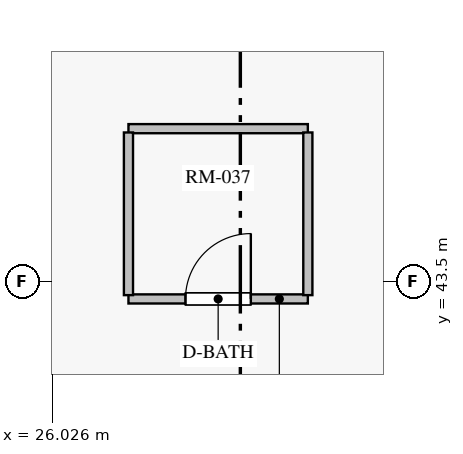
"""IFC4 building model, lengths in metres.
Left out: names, types, materials, properties, quantities, classifications, styles, units other than length and angle.
Written with IfcOpenShell. Run it as: python <this file> out.ifc"""

import sys

from ifc_helpers import new_model, si_unit, direction, frame, frame_2d, origin, origin_with_axes, place, context, subcontext, project, spatial, rectangle, extrude, source, transform, mapped, element, fill, save


model = new_model("IFC4")
c1 = context("Model", 3, precision=1e-05, world=origin(), true_north=direction((0.0, 1.0)))
c2 = subcontext(c1, "Body", "Model", "MODEL_VIEW")
j1 = project(units=[si_unit("LENGTHUNIT", "METRE"), si_unit("PLANEANGLEUNIT", "RADIAN")], contexts=[c1])
p1 = place(None, origin())
s1 = spatial("IfcSite", under=j1, at=p1, CompositionType="ELEMENT")
p2 = place(p1, origin())
s2 = spatial("IfcBuilding", under=s1, at=p2, CompositionType="ELEMENT")
p3 = place(p2, frame((0.0, 0.0, 232.15)))
s3 = spatial("IfcBuildingStorey", under=s2, at=p3, CompositionType="ELEMENT", Elevation=232.15)
p4 = place(p3, frame((37.604, 46.027, 0.0), z_axis=(0.0, 0.0, 1.0), x_axis=(-0.979153110394, 0.203123574224, 0.0)))
e1 = element("IfcWall", 1, at=p4, inside=s3, PredefinedType="SOLIDWALL", context=c2, shape_type="SweptSolid", body=[
    extrude(rectangle(XDim=9.367, YDim=0.28, at=frame_2d((4.683, 0.0))), origin(), (0.0, 0.0, 1.0), 2.85),
])
p5 = place(p4, frame((1.623, 0.0, 0.85)))
e2 = element("IfcOpeningElement", 2, at=p5, cuts=e1, PredefinedType="OPENING", context=c2, shape_type="SweptSolid", body=[
    extrude(rectangle(XDim=1.6, YDim=1.6, at=frame_2d((0.8, 0.8))), frame((0.0, 0.15, 0.0), z_axis=(0.0, -1.0, 0.0), x_axis=(1.0, 0.0, 0.0)), (0.0, 0.0, 1.0), 0.3),
])
p6 = place(p4, frame((6.246, 0.0, 0.85)))
e3 = element("IfcOpeningElement", 3, at=p6, cuts=e1, PredefinedType="OPENING", context=c2, shape_type="SweptSolid", body=[
    extrude(rectangle(XDim=1.6, YDim=1.6, at=frame_2d((0.8, 0.8))), frame((0.0, 0.15, 0.0), z_axis=(0.0, -1.0, 0.0), x_axis=(1.0, 0.0, 0.0)), (0.0, 0.0, 1.0), 0.3),
])
p7 = place(p3, frame((28.433, 47.93, 0.0), z_axis=(0.0, 0.0, 1.0), x_axis=(-0.921125636365, -0.389265413351, 0.0)))
e4 = element("IfcWall", 4, at=p7, inside=s3, PredefinedType="SOLIDWALL", context=c2, shape_type="SweptSolid", body=[
    extrude(rectangle(XDim=12.461, YDim=0.28, at=frame_2d((6.23, 0.0))), origin(), (0.0, 0.0, 1.0), 2.85),
])
p8 = place(p7, frame((1.53, 0.0, 0.85)))
e5 = element("IfcOpeningElement", 5, at=p8, cuts=e4, PredefinedType="OPENING", context=c2, shape_type="SweptSolid", body=[
    extrude(rectangle(XDim=1.6, YDim=1.6, at=frame_2d((0.8, 0.8))), frame((0.0, 0.15, 0.0), z_axis=(0.0, -1.0, 0.0), x_axis=(1.0, 0.0, 0.0)), (0.0, 0.0, 1.0), 0.3),
])
p9 = place(p7, frame((5.43, 0.0, 0.85)))
e6 = element("IfcOpeningElement", 6, at=p9, cuts=e4, PredefinedType="OPENING", context=c2, shape_type="SweptSolid", body=[
    extrude(rectangle(XDim=1.6, YDim=1.6, at=frame_2d((0.8, 0.8))), frame((0.0, 0.15, 0.0), z_axis=(0.0, -1.0, 0.0), x_axis=(1.0, 0.0, 0.0)), (0.0, 0.0, 1.0), 0.3),
])
p10 = place(p7, frame((9.331, 0.0, 0.85)))
e7 = element("IfcOpeningElement", 7, at=p10, cuts=e4, PredefinedType="OPENING", context=c2, shape_type="SweptSolid", body=[
    extrude(rectangle(XDim=1.6, YDim=1.6, at=frame_2d((0.8, 0.8))), frame((0.0, 0.15, 0.0), z_axis=(0.0, -1.0, 0.0), x_axis=(1.0, 0.0, 0.0)), (0.0, 0.0, 1.0), 0.3),
])
p11 = place(p3, frame((27.028, 43.272, 0.0), z_axis=(0.0, 0.0, 1.0), x_axis=(1.0, 0.0, 0.0)))
e8 = element("IfcWall", 8, at=p11, inside=s3, PredefinedType="PARTITIONING", context=c2, shape_type="SweptSolid", body=[
    extrude(rectangle(XDim=2.36, YDim=0.12, at=frame_2d((1.18, 0.0))), origin(), (0.0, 0.0, 1.0), 2.85),
])
p12 = place(p11, frame((0.75, 0.0, 0.0)))
e9 = element("IfcOpeningElement", 9, at=p12, cuts=e8, PredefinedType="OPENING", context=c2, shape_type="SweptSolid", body=[
    extrude(rectangle(XDim=0.86, YDim=2.1, at=frame_2d((0.43, 1.05))), frame((0.0, 0.07, 0.0), z_axis=(0.0, -1.0, 0.0), x_axis=(1.0, 0.0, 0.0)), (0.0, 0.0, 1.0), 0.14),
])
p13 = place(p3, frame((29.388, 45.512, 0.0), z_axis=(0.0, 0.0, 1.0), x_axis=(-1.0, 0.0, 0.0)))
e10 = element("IfcWall", 10, at=p13, inside=s3, PredefinedType="PARTITIONING", context=c2, shape_type="SweptSolid", body=[
    extrude(rectangle(XDim=2.36, YDim=0.12, at=frame_2d((1.18, 0.0))), origin(), (0.0, 0.0, 1.0), 2.85),
])
for number, where, z_axis, x_axis in (
    (11, (29.388, 43.322, 0.0), (0.0, 0.0, 1.0), (0.0, 1.0, 0.0)),
    (12, (27.028, 45.462, 0.0), (0.0, 0.0, 1.0), (0.0, -1.0, 0.0)),
):
    element("IfcWall", number, at=place(p3, frame(where, z_axis=z_axis, x_axis=x_axis)), inside=s3, PredefinedType="PARTITIONING", context=c2, shape_type="SweptSolid", body=[
        extrude(rectangle(XDim=2.14, YDim=0.12, at=frame_2d((1.07, 0.0))), origin(), (0.0, 0.0, 1.0), 2.85),
    ])
m1 = source(origin_with_axes(), c2, "Body", "SweptSolid", [
    extrude(rectangle(XDim=0.86, YDim=2.1, at=frame_2d((0.43, 1.05))), frame((0.0, 0.025, 0.0), z_axis=(0.0, -1.0, 0.0), x_axis=(1.0, 0.0, 0.0)), (0.0, 0.0, 1.0), 0.05),
])
p14 = place(p12, origin())
e13 = element("IfcDoor", 13, at=p14, inside=s3, OperationType="SINGLE_SWING_RIGHT", PredefinedType="DOOR", context=c2, shape_type="MappedRepresentation", body=[
    mapped(m1, transform((0.0, 0.0, 0.0), scale=1.0)),
])
fill(e9, e13)
save(model, sys.argv[1])
